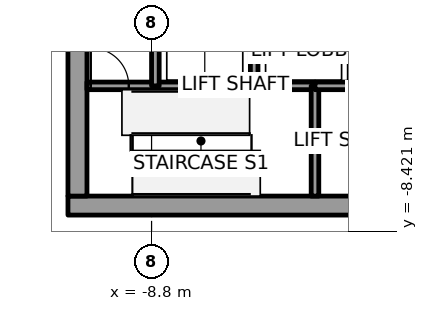
"""IFC4 building model, lengths in metres.
Left out: names, types, materials, properties, quantities, classifications, styles, units other than length and angle.
Written with IfcOpenShell. Run it as: python <this file> out.ifc"""

import sys

from ifc_helpers import new_model, si_unit, direction, frame, frame_2d, origin, place, context, subcontext, project, spatial, rectangle, extrude, element, fill, save


model = new_model("IFC4")
c1 = context("Model", 3, precision=1e-05, world=origin(), true_north=direction((0.0, 1.0)))
c2 = subcontext(c1, "Body", "Model", "MODEL_VIEW")
j1 = project(units=[si_unit("LENGTHUNIT", "METRE"), si_unit("PLANEANGLEUNIT", "RADIAN")], contexts=[c1])
p1 = place(None, origin())
s1 = spatial("IfcSite", under=j1, at=p1, CompositionType="ELEMENT")
p2 = place(p1, origin())
s2 = spatial("IfcBuilding", under=s1, at=p2, CompositionType="ELEMENT")
p3 = place(p2, frame((0.0, 0.0, 205.8)))
s3 = spatial("IfcBuildingStorey", under=s2, at=p3, CompositionType="ELEMENT", Elevation=205.8)
p4 = place(p3, frame((-11.0, -7.75, 0.0), z_axis=(0.0, 0.0, 1.0), x_axis=(1.0, 0.0, 0.0)))
e1 = element("IfcWall", 1, at=p4, inside=s3, PredefinedType="SHEAR", context=c2, shape_type="SweptSolid", body=[
    extrude(rectangle(XDim=22.0, YDim=0.5, at=frame_2d((11.0, 0.0))), origin(), (0.0, 0.0, 1.0), 4.0),
])
p5 = place(p4, frame((10.45, 0.0, 0.0)))
e2 = element("IfcOpeningElement", 2, at=p5, cuts=e1, PredefinedType="OPENING", context=c2, shape_type="SweptSolid", body=[
    extrude(rectangle(XDim=1.1, YDim=2.1, at=frame_2d((0.55, 1.05))), frame((0.0, 0.25, 0.0), z_axis=(0.0, -1.0, 0.0), x_axis=(1.0, 0.0, 0.0)), (0.0, 0.0, 1.0), 0.5),
])
p6 = place(p3, frame((-10.75, -7.5, 0.0), z_axis=(0.0, 0.0, 1.0), x_axis=(0.0, 1.0, 0.0)))
e3 = element("IfcWall", 3, at=p6, inside=s3, PredefinedType="SHEAR", context=c2, shape_type="SweptSolid", body=[
    extrude(rectangle(XDim=15.0, YDim=0.5, at=frame_2d((7.5, 0.0))), origin(), (0.0, 0.0, 1.0), 4.0),
])
p7 = place(p6, frame((6.6, 0.0, 0.0)))
e4 = element("IfcOpeningElement", 4, at=p7, cuts=e3, PredefinedType="OPENING", context=c2, shape_type="SweptSolid", body=[
    extrude(rectangle(XDim=1.8, YDim=2.1, at=frame_2d((0.9, 1.05))), frame((0.0, 0.25, 0.0), z_axis=(0.0, -1.0, 0.0), x_axis=(1.0, 0.0, 0.0)), (0.0, 0.0, 1.0), 0.5),
])
p8 = place(p3, frame((-10.5, -4.6, 0.0), z_axis=(0.0, 0.0, 1.0), x_axis=(1.0, 0.0, 0.0)))
e5 = element("IfcWall", 5, at=p8, inside=s3, PredefinedType="SOLIDWALL", context=c2, shape_type="SweptSolid", body=[
    extrude(rectangle(XDim=1.8, YDim=0.2, at=frame_2d((0.9, 0.0))), origin(), (0.0, 0.0, 1.0), 3.85),
])
p9 = place(p8, frame((0.1, 0.0, 0.0)))
e6 = element("IfcOpeningElement", 6, at=p9, cuts=e5, PredefinedType="OPENING", context=c2, shape_type="SweptSolid", body=[
    extrude(rectangle(XDim=1.0, YDim=2.1, at=frame_2d((0.5, 1.05))), frame((0.0, 0.1, 0.0), z_axis=(0.0, -1.0, 0.0), x_axis=(1.0, 0.0, 0.0)), (0.0, 0.0, 1.0), 0.2),
])
p10 = place(p3, frame((-8.7, -4.6, 0.0), z_axis=(0.0, 0.0, 1.0), x_axis=(1.0, 0.0, 0.0)))
e7 = element("IfcWall", 7, at=p10, inside=s3, PredefinedType="SOLIDWALL", context=c2, shape_type="SweptSolid", body=[
    extrude(rectangle(XDim=2.6, YDim=0.2, at=frame_2d((1.3, 0.0))), origin(), (0.0, 0.0, 1.0), 3.85),
])
p11 = place(p3, frame((-8.7, -4.6, 0.0), z_axis=(0.0, 0.0, 1.0), x_axis=(0.0, 1.0, 0.0)))
e8 = element("IfcWall", 8, at=p11, inside=s3, PredefinedType="SOLIDWALL", context=c2, shape_type="SweptSolid", body=[
    extrude(rectangle(XDim=2.8, YDim=0.2, at=frame_2d((1.4, 0.0))), origin(), (0.0, 0.0, 1.0), 3.85),
])
p12 = place(p3, frame((-6.1, -4.6, 0.0), z_axis=(0.0, 0.0, 1.0), x_axis=(1.0, 0.0, 0.0)))
e9 = element("IfcWall", 9, at=p12, inside=s3, PredefinedType="SOLIDWALL", context=c2, shape_type="SweptSolid", body=[
    extrude(rectangle(XDim=1.6, YDim=0.2, at=frame_2d((0.8, 0.0))), origin(), (0.0, 0.0, 1.0), 3.85),
])
p13 = place(p3, frame((-6.1, -4.6, 0.0), z_axis=(0.0, 0.0, 1.0), x_axis=(0.0, 1.0, 0.0)))
e10 = element("IfcWall", 10, at=p13, inside=s3, PredefinedType="SOLIDWALL", context=c2, shape_type="SweptSolid", body=[
    extrude(rectangle(XDim=2.8, YDim=0.2, at=frame_2d((1.4, 0.0))), origin(), (0.0, 0.0, 1.0), 3.85),
])
p14 = place(p3, frame((-4.5, -4.6, 0.0), z_axis=(0.0, 0.0, 1.0), x_axis=(0.0, -1.0, 0.0)))
e11 = element("IfcWall", 11, at=p14, inside=s3, PredefinedType="SOLIDWALL", context=c2, shape_type="SweptSolid", body=[
    extrude(rectangle(XDim=2.9, YDim=0.2, at=frame_2d((1.45, 0.0))), origin(), (0.0, 0.0, 1.0), 3.85),
])
p15 = place(p3, frame((-4.5, -4.6, 0.0), z_axis=(0.0, 0.0, 1.0), x_axis=(1.0, 0.0, 0.0)))
e12 = element("IfcWall", 12, at=p15, inside=s3, PredefinedType="SOLIDWALL", context=c2, shape_type="SweptSolid", body=[
    extrude(rectangle(XDim=1.0, YDim=0.2, at=frame_2d((0.5, 0.0))), origin(), (0.0, 0.0, 1.0), 3.85),
])
p16 = place(p9, origin())
e13 = element("IfcDoor", 13, at=p16, inside=s3, OperationType="SINGLE_SWING_LEFT", PredefinedType="DOOR", context=c2, shape_type="SweptSolid", body=[
    extrude(rectangle(XDim=1.0, YDim=2.1, at=frame_2d((0.5, 1.05))), frame((0.0, 0.025, 0.0), z_axis=(0.0, -1.0, 0.0), x_axis=(1.0, 0.0, 0.0)), (0.0, 0.0, 1.0), 0.05),
])
fill(e6, e13)
save(model, sys.argv[1])
